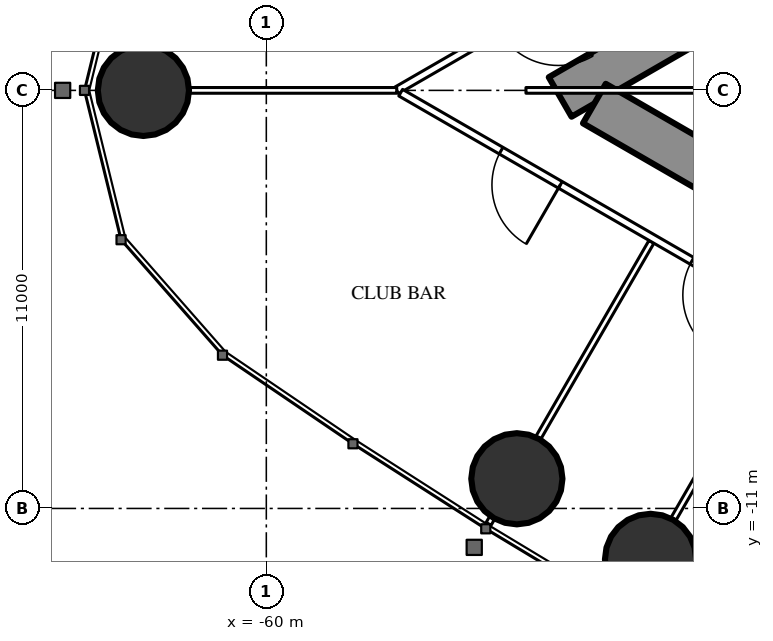
"""IFC4 building model, lengths in metres.
Left out: names, types, materials, properties, quantities, classifications, styles, units other than length and angle.
Written with IfcOpenShell. Run it as: python <this file> out.ifc"""

import sys

from ifc_helpers import new_model, si_unit, direction, frame, frame_2d, origin, origin_2d, place, context, subcontext, project, spatial, rectangle, circle, extrude, element, fill, save


model = new_model("IFC4")
c1 = context("Model", 3, precision=1e-05, world=origin(), true_north=direction((0.0, 1.0)))
c2 = subcontext(c1, "Body", "Model", "MODEL_VIEW")
j1 = project(units=[si_unit("LENGTHUNIT", "METRE"), si_unit("PLANEANGLEUNIT", "RADIAN")], contexts=[c1])
p1 = place(None, origin())
s1 = spatial("IfcSite", under=j1, at=p1, CompositionType="ELEMENT")
p2 = place(p1, origin())
s2 = spatial("IfcBuilding", under=s1, at=p2, CompositionType="ELEMENT")
p3 = place(p2, frame((0.0, 0.0, 247.7)))
s3 = spatial("IfcBuildingStorey", under=s2, at=p3, CompositionType="ELEMENT", Elevation=247.7)
for number, where, z_axis, x_axis in (
    (1, (-63.234, 0.0, 0.0), (0.0, 0.0, 1.0), (1.0, 0.0, 0.0)),
    (2, (-53.408, -10.219, 0.0), (0.0, 0.0, 1.0), (1.0, 0.0, 0.0)),
    (3, (-49.89, -12.34, 0.0), (0.0, 0.0, 1.0), (1.0, 0.0, 0.0)),
):
    element("IfcColumn", number, at=place(p3, frame(where, z_axis=z_axis, x_axis=x_axis)), inside=s3, PredefinedType="COLUMN", context=c2, shape_type="SweptSolid", body=[
        extrude(circle(Radius=1.2, at=origin_2d()), origin(), (0.0, 0.0, 1.0), 4.2),
    ])
p4 = place(p3, frame((-27.2, 14.3, 0.0), z_axis=(0.0, 0.0, 1.0), x_axis=(-0.866026593062, -0.499997940104, 0.0)))
e4 = element("IfcWall", 4, at=p4, inside=s3, PredefinedType="SHEAR", context=c2, shape_type="SweptSolid", body=[
    extrude(rectangle(XDim=28.946, YDim=1.2, at=frame_2d((14.473, 0.0))), origin(), (0.0, 0.0, 1.0), 4.2),
])
p5 = place(p4, frame((4.6, 0.0, 0.0)))
e5 = element("IfcOpeningElement", 5, at=p5, cuts=e4, PredefinedType="OPENING", context=c2, shape_type="SweptSolid", body=[
    extrude(rectangle(XDim=1.0, YDim=2.2, at=frame_2d((0.5, 1.1))), frame((0.0, 0.61, 0.0), z_axis=(0.0, -1.0, 0.0), x_axis=(1.0, 0.0, 0.0)), (0.0, 0.0, 1.0), 1.22),
])
p6 = place(p4, frame((13.395, 0.0, 0.0)))
e6 = element("IfcOpeningElement", 6, at=p6, cuts=e4, PredefinedType="OPENING", context=c2, shape_type="SweptSolid", body=[
    extrude(rectangle(XDim=1.8, YDim=2.2, at=frame_2d((0.9, 1.1))), frame((0.0, 0.61, 0.0), z_axis=(0.0, -1.0, 0.0), x_axis=(1.0, 0.0, 0.0)), (0.0, 0.0, 1.0), 1.22),
])
p7 = place(p3, frame((-27.2, -14.3, 0.0), z_axis=(0.0, 0.0, 1.0), x_axis=(-0.866024021859, 0.500002393557, 0.0)))
e7 = element("IfcWall", 7, at=p7, inside=s3, PredefinedType="SHEAR", context=c2, shape_type="SweptSolid", body=[
    extrude(rectangle(XDim=27.907, YDim=1.2, at=frame_2d((13.954, 0.0))), origin(), (0.0, 0.0, 1.0), 4.2),
])
p8 = place(p7, frame((4.6, 0.0, 0.0)))
e8 = element("IfcOpeningElement", 8, at=p8, cuts=e7, PredefinedType="OPENING", context=c2, shape_type="SweptSolid", body=[
    extrude(rectangle(XDim=1.0, YDim=2.2, at=frame_2d((0.5, 1.1))), frame((0.0, 0.61, 0.0), z_axis=(0.0, -1.0, 0.0), x_axis=(1.0, 0.0, 0.0)), (0.0, 0.0, 1.0), 1.22),
])
p9 = place(p7, frame((13.395, 0.0, 0.0)))
e9 = element("IfcOpeningElement", 9, at=p9, cuts=e7, PredefinedType="OPENING", context=c2, shape_type="SweptSolid", body=[
    extrude(rectangle(XDim=1.8, YDim=2.2, at=frame_2d((0.9, 1.1))), frame((0.0, 0.61, 0.0), z_axis=(0.0, -1.0, 0.0), x_axis=(1.0, 0.0, 0.0)), (0.0, 0.0, 1.0), 1.22),
])
p10 = place(p3, frame((-28.681, 16.101, 0.0), z_axis=(0.0, 0.0, 1.0), x_axis=(-0.866024860443, -0.500000941094, 0.0)))
e10 = element("IfcWall", 10, at=p10, inside=s3, PredefinedType="PARTITIONING", context=c2, shape_type="SweptSolid", body=[
    extrude(rectangle(XDim=32.201, YDim=0.2, at=frame_2d((16.101, 0.0))), origin(), (0.0, 0.0, 1.0), 3.95),
])
p11 = place(p10, frame((7.266, 0.0, 0.0)))
e11 = element("IfcOpeningElement", 11, at=p11, cuts=e10, PredefinedType="OPENING", context=c2, shape_type="SweptSolid", body=[
    extrude(rectangle(XDim=1.8, YDim=2.2, at=frame_2d((0.9, 1.1))), frame((0.0, 0.11, 0.0), z_axis=(0.0, -1.0, 0.0), x_axis=(1.0, 0.0, 0.0)), (0.0, 0.0, 1.0), 0.22),
])
p12 = place(p10, frame((17.281, 0.0, 0.0)))
e12 = element("IfcOpeningElement", 12, at=p12, cuts=e10, PredefinedType="OPENING", context=c2, shape_type="SweptSolid", body=[
    extrude(rectangle(XDim=1.8, YDim=2.2, at=frame_2d((0.9, 1.1))), frame((0.0, 0.11, 0.0), z_axis=(0.0, -1.0, 0.0), x_axis=(1.0, 0.0, 0.0)), (0.0, 0.0, 1.0), 0.22),
])
p13 = place(p10, frame((21.43, 0.0, 0.0)))
e13 = element("IfcOpeningElement", 13, at=p13, cuts=e10, PredefinedType="OPENING", context=c2, shape_type="SweptSolid", body=[
    extrude(rectangle(XDim=1.8, YDim=2.2, at=frame_2d((0.9, 1.1))), frame((0.0, 0.11, 0.0), z_axis=(0.0, -1.0, 0.0), x_axis=(1.0, 0.0, 0.0)), (0.0, 0.0, 1.0), 0.22),
])
p14 = place(p10, frame((27.29, 0.0, 0.0)))
e14 = element("IfcOpeningElement", 14, at=p14, cuts=e10, PredefinedType="OPENING", context=c2, shape_type="SweptSolid", body=[
    extrude(rectangle(XDim=1.8, YDim=2.2, at=frame_2d((0.9, 1.1))), frame((0.0, 0.11, 0.0), z_axis=(0.0, -1.0, 0.0), x_axis=(1.0, 0.0, 0.0)), (0.0, 0.0, 1.0), 0.22),
])
p15 = place(p3, frame((-46.274, -6.059, 0.0), z_axis=(0.0, 0.0, 1.0), x_axis=(-0.500020471368, -0.866013584312, 0.0)))
e15 = element("IfcWall", 15, at=p15, inside=s3, PredefinedType="PARTITIONING", context=c2, shape_type="SweptSolid", body=[
    extrude(rectangle(XDim=6.028, YDim=0.15, at=frame_2d((3.014, 0.0))), origin(), (0.0, 0.0, 1.0), 3.05),
])
p16 = place(p3, frame((-49.866, -3.985, 0.0), z_axis=(0.0, 0.0, 1.0), x_axis=(-0.500000694566, -0.866025002776, 0.0)))
e16 = element("IfcWall", 16, at=p16, inside=s3, PredefinedType="PARTITIONING", context=c2, shape_type="SweptSolid", body=[
    extrude(rectangle(XDim=5.95, YDim=0.15, at=frame_2d((2.975, 0.0))), origin(), (0.0, 0.0, 1.0), 3.05),
])
p17 = place(p3, frame((-54.061, -11.25, 0.0), z_axis=(0.0, 0.0, 1.0), x_axis=(-0.500391173478, -0.865799441849, 0.0)))
e17 = element("IfcWall", 17, at=p17, inside=s3, PredefinedType="PARTITIONING", context=c2, shape_type="SweptSolid", body=[
    extrude(rectangle(XDim=0.179, YDim=0.15, at=frame_2d((0.089, 0.0))), origin(), (0.0, 0.0, 1.0), 3.05),
])
p18 = place(p3, frame((-56.568, 0.0, 0.0), z_axis=(0.0, 0.0, 1.0), x_axis=(-1.0, 0.0, 0.0)))
e18 = element("IfcWall", 18, at=p18, inside=s3, PredefinedType="PARTITIONING", context=c2, shape_type="SweptSolid", body=[
    extrude(rectangle(XDim=5.446, YDim=0.15, at=frame_2d((2.723, 0.0))), origin(), (0.0, 0.0, 1.0), 3.05),
])
p19 = place(p3, frame((-44.715, -6.844, 0.0), z_axis=(0.0, 0.0, 1.0), x_axis=(-0.866025261224, 0.500000246922, 0.0)))
e19 = element("IfcWall", 19, at=p19, inside=s3, PredefinedType="PARTITIONING", context=c2, shape_type="SweptSolid", body=[
    extrude(rectangle(XDim=13.567, YDim=0.2, at=frame_2d((6.783, 0.0))), origin(), (0.0, 0.0, 1.0), 3.95),
])
p20 = place(p19, frame((8.716, 0.0, 0.0)))
e20 = element("IfcOpeningElement", 20, at=p20, cuts=e19, PredefinedType="OPENING", context=c2, shape_type="SweptSolid", body=[
    extrude(rectangle(XDim=1.8, YDim=2.2, at=frame_2d((0.9, 1.1))), frame((0.0, 0.11, 0.0), z_axis=(0.0, -1.0, 0.0), x_axis=(1.0, 0.0, 0.0)), (0.0, 0.0, 1.0), 0.22),
])
p21 = place(p19, frame((2.916, 0.0, 0.0)))
e21 = element("IfcOpeningElement", 21, at=p21, cuts=e19, PredefinedType="OPENING", context=c2, shape_type="SweptSolid", body=[
    extrude(rectangle(XDim=1.8, YDim=2.2, at=frame_2d((0.9, 1.1))), frame((0.0, 0.11, 0.0), z_axis=(0.0, -1.0, 0.0), x_axis=(1.0, 0.0, 0.0)), (0.0, 0.0, 1.0), 0.22),
])
p22 = place(p19, frame((0.5, 0.0, 0.0)))
e22 = element("IfcOpeningElement", 22, at=p22, cuts=e19, PredefinedType="OPENING", context=c2, shape_type="SweptSolid", body=[
    extrude(rectangle(XDim=0.967, YDim=2.2, at=frame_2d((0.483, 1.1))), frame((0.0, 0.11, 0.0), z_axis=(0.0, -1.0, 0.0), x_axis=(1.0, 0.0, 0.0)), (0.0, 0.0, 1.0), 0.22),
])
p23 = place(p3, frame((-44.575, 0.0, 0.0), z_axis=(0.0, 0.0, 1.0), x_axis=(-1.0, 0.0, 0.0)))
e23 = element("IfcWall", 23, at=p23, inside=s3, PredefinedType="PARTITIONING", context=c2, shape_type="SweptSolid", body=[
    extrude(rectangle(XDim=8.593, YDim=0.15, at=frame_2d((4.297, 0.0))), origin(), (0.0, 0.0, 1.0), 3.05),
])
p24 = place(p20, origin())
e24 = element("IfcDoor", 24, at=p24, inside=s3, OperationType="DOUBLE_DOOR_SINGLE_SWING", PredefinedType="DOOR", context=c2, shape_type="SweptSolid", body=[
    extrude(rectangle(XDim=1.8, YDim=2.2, at=frame_2d((0.9, 1.1))), frame((0.0, 0.025, 0.0), z_axis=(0.0, -1.0, 0.0), x_axis=(1.0, 0.0, 0.0)), (0.0, 0.0, 1.0), 0.05),
])
fill(e20, e24)
p25 = place(p21, origin())
e25 = element("IfcDoor", 25, at=p25, inside=s3, OperationType="DOUBLE_DOOR_SINGLE_SWING", PredefinedType="DOOR", context=c2, shape_type="SweptSolid", body=[
    extrude(rectangle(XDim=1.8, YDim=2.2, at=frame_2d((0.9, 1.1))), frame((0.0, 0.025, 0.0), z_axis=(0.0, -1.0, 0.0), x_axis=(1.0, 0.0, 0.0)), (0.0, 0.0, 1.0), 0.05),
])
fill(e21, e25)
save(model, sys.argv[1])
